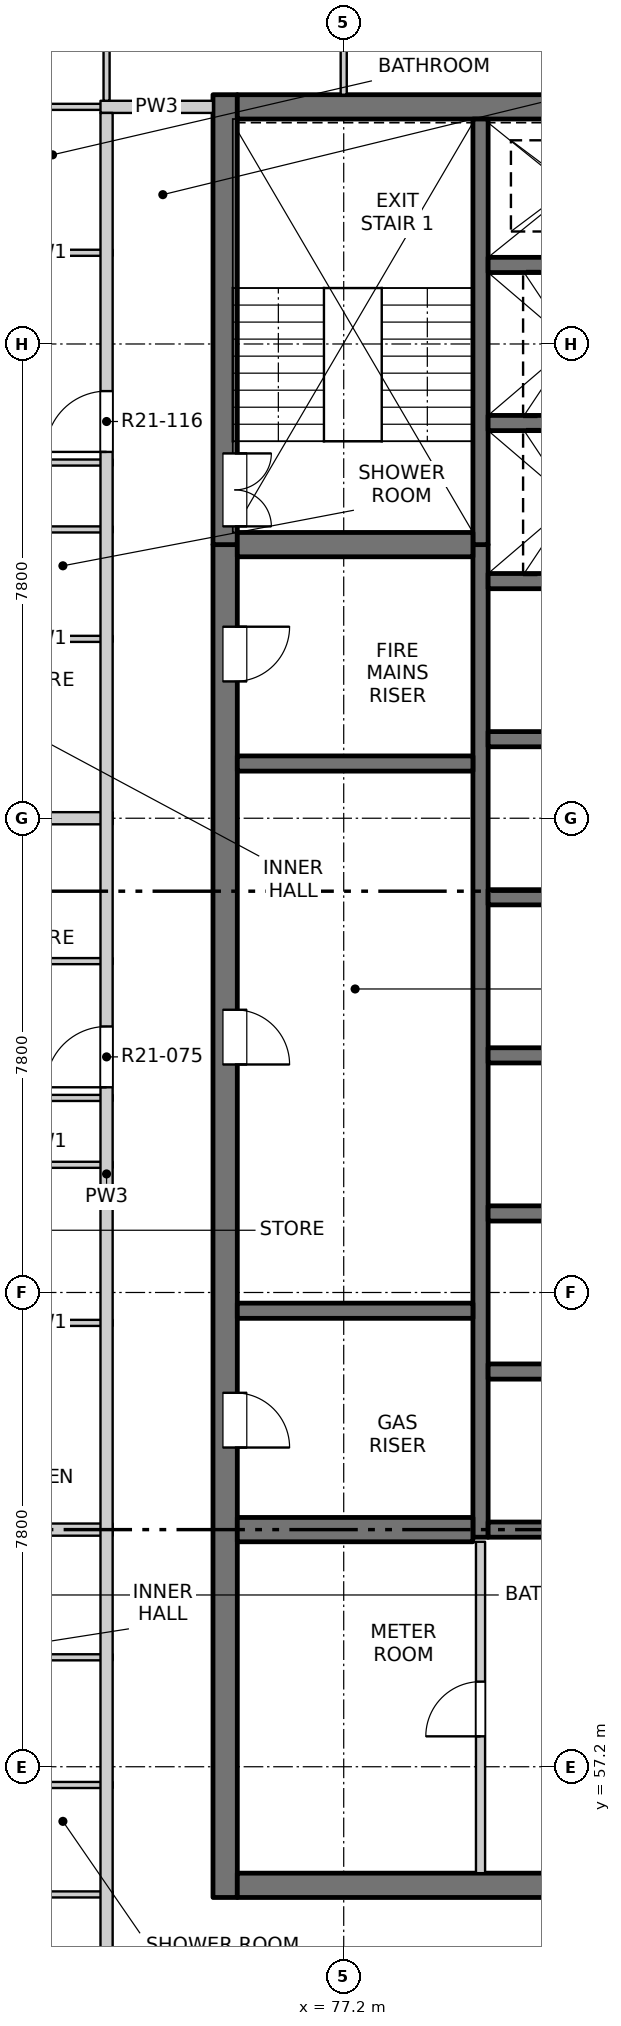
"""IFC4 building model, lengths in metres.
Left out: names, types, materials, properties, quantities, classifications, styles, units other than length and angle.
Written with IfcOpenShell. Run it as: python <this file> out.ifc"""

import sys

from ifc_helpers import new_model, si_unit, direction, frame, frame_2d, origin, place, context, subcontext, project, spatial, rectangle, extrude, element, fill, save


model = new_model("IFC4")
c1 = context("Model", 3, precision=1e-05, world=origin(), true_north=direction((0.0, 1.0)))
c2 = subcontext(c1, "Body", "Model", "MODEL_VIEW")
j1 = project(units=[si_unit("LENGTHUNIT", "METRE"), si_unit("PLANEANGLEUNIT", "RADIAN")], contexts=[c1])
p1 = place(None, origin())
s1 = spatial("IfcSite", under=j1, at=p1, CompositionType="ELEMENT")
p2 = place(p1, origin())
s2 = spatial("IfcBuilding", under=s1, at=p2, CompositionType="ELEMENT")
p3 = place(p2, frame((0.0, 0.0, 214.3)))
s3 = spatial("IfcBuildingStorey", under=s2, at=p3, CompositionType="ELEMENT", Elevation=214.3)
p4 = place(p3, frame((75.25, 55.05, -0.25), z_axis=(0.0, 0.0, 1.0), x_axis=(0.0, 1.0, 0.0)))
e1 = element("IfcWall", 1, at=p4, inside=s3, PredefinedType="SOLIDWALL", context=c2, shape_type="SweptSolid", body=[
    extrude(rectangle(XDim=22.25, YDim=0.4, at=frame_2d((11.125, 0.0))), origin(), (0.0, 0.0, 1.0), 3.4),
])
p5 = place(p4, frame((7.4, 0.0, 0.25)))
e2 = element("IfcOpeningElement", 2, at=p5, cuts=e1, PredefinedType="OPENING", context=c2, shape_type="SweptSolid", body=[
    extrude(rectangle(XDim=0.9, YDim=2.1, at=frame_2d((0.45, 1.05))), frame((0.0, 0.21, 0.0), z_axis=(0.0, -1.0, 0.0), x_axis=(1.0, 0.0, 0.0)), (0.0, 0.0, 1.0), 0.42),
])
p6 = place(p4, frame((13.7, 0.0, 0.25)))
e3 = element("IfcOpeningElement", 3, at=p6, cuts=e1, PredefinedType="OPENING", context=c2, shape_type="SweptSolid", body=[
    extrude(rectangle(XDim=0.9, YDim=2.1, at=frame_2d((0.45, 1.05))), frame((0.0, 0.21, 0.0), z_axis=(0.0, -1.0, 0.0), x_axis=(1.0, 0.0, 0.0)), (0.0, 0.0, 1.0), 0.42),
])
p7 = place(p4, frame((20.0, 0.0, 0.25)))
e4 = element("IfcOpeningElement", 4, at=p7, cuts=e1, PredefinedType="OPENING", context=c2, shape_type="SweptSolid", body=[
    extrude(rectangle(XDim=0.9, YDim=2.1, at=frame_2d((0.45, 1.05))), frame((0.0, 0.21, 0.0), z_axis=(0.0, -1.0, 0.0), x_axis=(1.0, 0.0, 0.0)), (0.0, 0.0, 1.0), 0.42),
])
p8 = place(p3, frame((75.25, 77.3, -0.25), z_axis=(0.0, 0.0, 1.0), x_axis=(0.0, 1.0, 0.0)))
e5 = element("IfcWall", 5, at=p8, inside=s3, PredefinedType="SOLIDWALL", context=c2, shape_type="SweptSolid", body=[
    extrude(rectangle(XDim=7.4, YDim=0.4, at=frame_2d((3.7, 0.0))), origin(), (0.0, 0.0, 1.0), 3.4),
])
p9 = place(p8, frame((0.3, 0.0, 0.25)))
e6 = element("IfcOpeningElement", 6, at=p9, cuts=e5, PredefinedType="OPENING", context=c2, shape_type="SweptSolid", body=[
    extrude(rectangle(XDim=1.2, YDim=2.1, at=frame_2d((0.6, 1.05))), frame((0.0, 0.21, 0.0), z_axis=(0.0, -1.0, 0.0), x_axis=(1.0, 0.0, 0.0)), (0.0, 0.0, 1.0), 0.42),
])
p10 = place(p3, frame((75.45, 55.25, -0.25), z_axis=(0.0, 0.0, 1.0), x_axis=(1.0, 0.0, 0.0)))
e7 = element("IfcWall", 7, at=p10, inside=s3, PredefinedType="SOLIDWALL", context=c2, shape_type="SweptSolid", body=[
    extrude(rectangle(XDim=19.1, YDim=0.4, at=frame_2d((9.55, 0.0))), origin(), (0.0, 0.0, 1.0), 3.4),
])
p11 = place(p10, frame((8.8, 0.0, 0.25)))
e8 = element("IfcOpeningElement", 8, at=p11, cuts=e7, PredefinedType="OPENING", context=c2, shape_type="SweptSolid", body=[
    extrude(rectangle(XDim=1.5, YDim=2.1, at=frame_2d((0.75, 1.05))), frame((0.0, 0.21, 0.0), z_axis=(0.0, -1.0, 0.0), x_axis=(1.0, 0.0, 0.0)), (0.0, 0.0, 1.0), 0.42),
])
p12 = place(p3, frame((75.45, 84.5, -0.25), z_axis=(0.0, 0.0, 1.0), x_axis=(1.0, 0.0, 0.0)))
e9 = element("IfcWall", 9, at=p12, inside=s3, PredefinedType="SOLIDWALL", context=c2, shape_type="SweptSolid", body=[
    extrude(rectangle(XDim=19.1, YDim=0.4, at=frame_2d((9.55, 0.0))), origin(), (0.0, 0.0, 1.0), 3.4),
])
p13 = place(p3, frame((79.45, 60.975, -0.25), z_axis=(0.0, 0.0, 1.0), x_axis=(0.0, 1.0, 0.0)))
e10 = element("IfcWall", 10, at=p13, inside=s3, PredefinedType="SOLIDWALL", context=c2, shape_type="SweptSolid", body=[
    extrude(rectangle(XDim=16.325, YDim=0.25, at=frame_2d((8.163, 0.0))), origin(), (0.0, 0.0, 1.0), 3.4),
])
p14 = place(p3, frame((79.45, 77.3, -0.25), z_axis=(0.0, 0.0, 1.0), x_axis=(0.0, 1.0, 0.0)))
e11 = element("IfcWall", 11, at=p14, inside=s3, PredefinedType="SOLIDWALL", context=c2, shape_type="SweptSolid", body=[
    extrude(rectangle(XDim=7.0, YDim=0.25, at=frame_2d((3.5, 0.0))), origin(), (0.0, 0.0, 1.0), 3.4),
])
for number, where, z_axis, x_axis in (
    (12, (79.575, 61.1, -0.25), (0.0, 0.0, 1.0), (1.0, 0.0, 0.0)),
    (13, (79.575, 63.7, -0.25), (0.0, 0.0, 1.0), (1.0, 0.0, 0.0)),
    (14, (79.575, 66.3, -0.25), (0.0, 0.0, 1.0), (1.0, 0.0, 0.0)),
    (15, (79.575, 68.9, -0.25), (0.0, 0.0, 1.0), (1.0, 0.0, 0.0)),
    (16, (79.575, 71.5, -0.25), (0.0, 0.0, 1.0), (1.0, 0.0, 0.0)),
    (17, (79.575, 74.1, -0.25), (0.0, 0.0, 1.0), (1.0, 0.0, 0.0)),
    (18, (79.575, 76.7, -0.25), (0.0, 0.0, 1.0), (1.0, 0.0, 0.0)),
    (19, (79.575, 79.3, -0.25), (0.0, 0.0, 1.0), (1.0, 0.0, 0.0)),
    (20, (79.575, 81.9, -0.25), (0.0, 0.0, 1.0), (1.0, 0.0, 0.0)),
):
    element("IfcWall", number, at=place(p3, frame(where, z_axis=z_axis, x_axis=x_axis)), inside=s3, PredefinedType="SOLIDWALL", context=c2, shape_type="SweptSolid", body=[
        extrude(rectangle(XDim=3.0, YDim=0.25, at=frame_2d((1.5, 0.0))), origin(), (0.0, 0.0, 1.0), 3.4),
    ])
p15 = place(p3, frame((75.45, 61.1, -0.25), z_axis=(0.0, 0.0, 1.0), x_axis=(1.0, 0.0, 0.0)))
e21 = element("IfcWall", 21, at=p15, inside=s3, PredefinedType="SOLIDWALL", context=c2, shape_type="SweptSolid", body=[
    extrude(rectangle(XDim=3.875, YDim=0.4, at=frame_2d((1.938, 0.0))), origin(), (0.0, 0.0, 1.0), 3.4),
])
for number, where, z_axis, x_axis in (
    (22, (75.45, 64.7, -0.25), (0.0, 0.0, 1.0), (1.0, 0.0, 0.0)),
    (23, (75.45, 73.7, -0.25), (0.0, 0.0, 1.0), (1.0, 0.0, 0.0)),
):
    element("IfcWall", number, at=place(p3, frame(where, z_axis=z_axis, x_axis=x_axis)), inside=s3, PredefinedType="SOLIDWALL", context=c2, shape_type="SweptSolid", body=[
        extrude(rectangle(XDim=3.875, YDim=0.25, at=frame_2d((1.938, 0.0))), origin(), (0.0, 0.0, 1.0), 3.4),
    ])
p16 = place(p3, frame((75.45, 77.3, -0.25), z_axis=(0.0, 0.0, 1.0), x_axis=(1.0, 0.0, 0.0)))
e24 = element("IfcWall", 24, at=p16, inside=s3, PredefinedType="SOLIDWALL", context=c2, shape_type="SweptSolid", body=[
    extrude(rectangle(XDim=3.875, YDim=0.4, at=frame_2d((1.938, 0.0))), origin(), (0.0, 0.0, 1.0), 3.4),
])
for number, where, z_axis, x_axis in (
    (25, (71.18, 55.1, 0.0), (0.0, 0.0, 1.0), (1.0, 0.0, 0.0)),
    (26, (71.18, 56.9, 0.0), (0.0, 0.0, 1.0), (1.0, 0.0, 0.0)),
    (27, (71.18, 59.0, 0.0), (0.0, 0.0, 1.0), (1.0, 0.0, 0.0)),
):
    element("IfcWall", number, at=place(p3, frame(where, z_axis=z_axis, x_axis=x_axis)), inside=s3, PredefinedType="PARTITIONING", context=c2, shape_type="SweptSolid", body=[
        extrude(rectangle(XDim=2.22, YDim=0.1, at=frame_2d((1.11, 0.0))), origin(), (0.0, 0.0, 1.0), 3.15),
    ])
p17 = place(p3, frame((61.9, 61.1, 0.0), z_axis=(0.0, 0.0, 1.0), x_axis=(1.0, 0.0, 0.0)))
e28 = element("IfcWall", 28, at=p17, inside=s3, PredefinedType="PARTITIONING", context=c2, shape_type="SweptSolid", body=[
    extrude(rectangle(XDim=11.5, YDim=0.2, at=frame_2d((5.75, 0.0))), origin(), (0.0, 0.0, 1.0), 2.55),
])
for number, where, z_axis, x_axis in (
    (29, (71.18, 64.5, 0.0), (0.0, 0.0, 1.0), (1.0, 0.0, 0.0)),
    (30, (71.18, 67.1, 0.0), (0.0, 0.0, 1.0), (1.0, 0.0, 0.0)),
    (31, (71.18, 68.2, 0.0), (0.0, 0.0, 1.0), (1.0, 0.0, 0.0)),
    (32, (71.18, 70.45, 0.0), (0.0, 0.0, 1.0), (1.0, 0.0, 0.0)),
):
    element("IfcWall", number, at=place(p3, frame(where, z_axis=z_axis, x_axis=x_axis)), inside=s3, PredefinedType="PARTITIONING", context=c2, shape_type="SweptSolid", body=[
        extrude(rectangle(XDim=2.22, YDim=0.1, at=frame_2d((1.11, 0.0))), origin(), (0.0, 0.0, 1.0), 3.15),
    ])
p18 = place(p3, frame((61.9, 72.8, 0.0), z_axis=(0.0, 0.0, 1.0), x_axis=(1.0, 0.0, 0.0)))
e33 = element("IfcWall", 33, at=p18, inside=s3, PredefinedType="PARTITIONING", context=c2, shape_type="SweptSolid", body=[
    extrude(rectangle(XDim=11.5, YDim=0.2, at=frame_2d((5.75, 0.0))), origin(), (0.0, 0.0, 1.0), 3.15),
])
for number, where, z_axis, x_axis in (
    (34, (71.18, 75.75, 0.0), (0.0, 0.0, 1.0), (1.0, 0.0, 0.0)),
    (35, (71.18, 77.55, 0.0), (0.0, 0.0, 1.0), (1.0, 0.0, 0.0)),
    (36, (71.18, 78.65, 0.0), (0.0, 0.0, 1.0), (1.0, 0.0, 0.0)),
    (37, (71.18, 82.1, 0.0), (0.0, 0.0, 1.0), (1.0, 0.0, 0.0)),
):
    element("IfcWall", number, at=place(p3, frame(where, z_axis=z_axis, x_axis=x_axis)), inside=s3, PredefinedType="PARTITIONING", context=c2, shape_type="SweptSolid", body=[
        extrude(rectangle(XDim=2.22, YDim=0.1, at=frame_2d((1.11, 0.0))), origin(), (0.0, 0.0, 1.0), 3.15),
    ])
p19 = place(p3, frame((61.9, 84.5, 0.0), z_axis=(0.0, 0.0, 1.0), x_axis=(1.0, 0.0, 0.0)))
e38 = element("IfcWall", 38, at=p19, inside=s3, PredefinedType="PARTITIONING", context=c2, shape_type="SweptSolid", body=[
    extrude(rectangle(XDim=11.5, YDim=0.1, at=frame_2d((5.75, 0.0))), origin(), (0.0, 0.0, 1.0), 3.15),
])
p20 = place(p19, frame((7.965, 0.0, 0.0)))
e39 = element("IfcOpeningElement", 39, at=p20, cuts=e38, PredefinedType="OPENING", context=c2, shape_type="SweptSolid", body=[
    extrude(rectangle(XDim=0.9, YDim=2.1, at=frame_2d((0.45, 1.05))), frame((0.0, 0.06, 0.0), z_axis=(0.0, -1.0, 0.0), x_axis=(1.0, 0.0, 0.0)), (0.0, 0.0, 1.0), 0.12),
])
p21 = place(p3, frame((73.2, 84.5, 0.0), z_axis=(0.0, 0.0, 1.0), x_axis=(1.0, 0.0, 0.0)))
e40 = element("IfcWall", 40, at=p21, inside=s3, PredefinedType="PARTITIONING", context=c2, shape_type="SweptSolid", body=[
    extrude(rectangle(XDim=1.85, YDim=0.2, at=frame_2d((0.925, 0.0))), origin(), (0.0, 0.0, 1.0), 3.15),
])
p22 = place(p3, frame((73.3, 49.5, 0.0), z_axis=(0.0, 0.0, 1.0), x_axis=(0.0, 1.0, 0.0)))
e41 = element("IfcWall", 41, at=p22, inside=s3, PredefinedType="PARTITIONING", context=c2, shape_type="SweptSolid", body=[
    extrude(rectangle(XDim=34.9, YDim=0.2, at=frame_2d((17.45, 0.0))), origin(), (0.0, 0.0, 1.0), 3.15),
])
p23 = place(p22, frame((3.325, 0.0, 0.0)))
e42 = element("IfcOpeningElement", 42, at=p23, cuts=e41, PredefinedType="OPENING", context=c2, shape_type="SweptSolid", body=[
    extrude(rectangle(XDim=1.0, YDim=2.1, at=frame_2d((0.5, 1.05))), frame((0.0, 0.11, 0.0), z_axis=(0.0, -1.0, 0.0), x_axis=(1.0, 0.0, 0.0)), (0.0, 0.0, 1.0), 0.22),
])
p24 = place(p22, frame((18.875, 0.0, 0.0)))
e43 = element("IfcOpeningElement", 43, at=p24, cuts=e41, PredefinedType="OPENING", context=c2, shape_type="SweptSolid", body=[
    extrude(rectangle(XDim=1.0, YDim=2.1, at=frame_2d((0.5, 1.05))), frame((0.0, 0.11, 0.0), z_axis=(0.0, -1.0, 0.0), x_axis=(1.0, 0.0, 0.0)), (0.0, 0.0, 1.0), 0.22),
])
p25 = place(p22, frame((29.325, 0.0, 0.0)))
e44 = element("IfcOpeningElement", 44, at=p25, cuts=e41, PredefinedType="OPENING", context=c2, shape_type="SweptSolid", body=[
    extrude(rectangle(XDim=1.0, YDim=2.1, at=frame_2d((0.5, 1.05))), frame((0.0, 0.11, 0.0), z_axis=(0.0, -1.0, 0.0), x_axis=(1.0, 0.0, 0.0)), (0.0, 0.0, 1.0), 0.22),
])
p26 = place(p3, frame((73.3, 84.6, 0.0), z_axis=(0.0, 0.0, 1.0), x_axis=(0.0, 1.0, 0.0)))
e45 = element("IfcWall", 45, at=p26, inside=s3, PredefinedType="PARTITIONING", context=c2, shape_type="SweptSolid", body=[
    extrude(rectangle(XDim=3.5, YDim=0.1, at=frame_2d((1.75, 0.0))), origin(), (0.0, 0.0, 1.0), 3.15),
])
p27 = place(p26, frame((1.4, 0.0, 0.0)))
e46 = element("IfcOpeningElement", 46, at=p27, cuts=e45, PredefinedType="OPENING", context=c2, shape_type="SweptSolid", body=[
    extrude(rectangle(XDim=0.9, YDim=2.1, at=frame_2d((0.45, 1.05))), frame((0.0, 0.06, 0.0), z_axis=(0.0, -1.0, 0.0), x_axis=(1.0, 0.0, 0.0)), (0.0, 0.0, 1.0), 0.12),
])
p28 = place(p3, frame((77.2, 84.7, 0.0), z_axis=(0.0, 0.0, 1.0), x_axis=(0.0, 1.0, 0.0)))
e47 = element("IfcWall", 47, at=p28, inside=s3, PredefinedType="PARTITIONING", context=c2, shape_type="SweptSolid", body=[
    extrude(rectangle(XDim=3.4, YDim=0.1, at=frame_2d((1.7, 0.0))), origin(), (0.0, 0.0, 1.0), 3.15),
])
p29 = place(p28, frame((1.3, 0.0, 0.0)))
e48 = element("IfcOpeningElement", 48, at=p29, cuts=e47, PredefinedType="OPENING", context=c2, shape_type="SweptSolid", body=[
    extrude(rectangle(XDim=0.9, YDim=2.1, at=frame_2d((0.45, 1.05))), frame((0.0, 0.06, 0.0), z_axis=(0.0, -1.0, 0.0), x_axis=(1.0, 0.0, 0.0)), (0.0, 0.0, 1.0), 0.12),
])
p30 = place(p3, frame((79.45, 55.45, 0.0), z_axis=(0.0, 0.0, 1.0), x_axis=(0.0, 1.0, 0.0)))
e49 = element("IfcWall", 49, at=p30, inside=s3, PredefinedType="PARTITIONING", context=c2, shape_type="SweptSolid", body=[
    extrude(rectangle(XDim=5.45, YDim=0.15, at=frame_2d((2.725, 0.0))), origin(), (0.0, 0.0, 1.0), 3.15),
])
p31 = place(p30, frame((2.25, 0.0, 0.0)))
e50 = element("IfcOpeningElement", 50, at=p31, cuts=e49, PredefinedType="OPENING", context=c2, shape_type="SweptSolid", body=[
    extrude(rectangle(XDim=0.9, YDim=2.1, at=frame_2d((0.45, 1.05))), frame((0.0, 0.085, 0.0), z_axis=(0.0, -1.0, 0.0), x_axis=(1.0, 0.0, 0.0)), (0.0, 0.0, 1.0), 0.17),
])
p32 = place(p31, origin())
e51 = element("IfcDoor", 51, at=p32, inside=s3, OperationType="SINGLE_SWING_LEFT", PredefinedType="DOOR", context=c2, shape_type="SweptSolid", body=[
    extrude(rectangle(XDim=0.9, YDim=2.1, at=frame_2d((0.45, 1.05))), frame((0.0, 0.025, 0.0), z_axis=(0.0, -1.0, 0.0), x_axis=(1.0, 0.0, 0.0)), (0.0, 0.0, 1.0), 0.05),
])
fill(e50, e51)
p33 = place(p5, origin())
e52 = element("IfcDoor", 52, at=p33, inside=s3, OperationType="SINGLE_SWING_RIGHT", PredefinedType="DOOR", context=c2, shape_type="SweptSolid", body=[
    extrude(rectangle(XDim=0.9, YDim=2.1, at=frame_2d((0.45, 1.05))), frame((0.0, -0.135, 0.0), z_axis=(0.0, -1.0, 0.0), x_axis=(1.0, 0.0, 0.0)), (0.0, 0.0, 1.0), 0.05),
])
fill(e2, e52)
p34 = place(p24, origin())
e53 = element("IfcDoor", 53, at=p34, inside=s3, OperationType="SINGLE_SWING_RIGHT", PredefinedType="DOOR", context=c2, shape_type="SweptSolid", body=[
    extrude(rectangle(XDim=1.0, YDim=2.1, at=frame_2d((0.5, 1.05))), frame((0.0, 0.025, 0.0), z_axis=(0.0, -1.0, 0.0), x_axis=(1.0, 0.0, 0.0)), (0.0, 0.0, 1.0), 0.05),
])
fill(e43, e53)
p35 = place(p6, origin())
e54 = element("IfcDoor", 54, at=p35, inside=s3, OperationType="SINGLE_SWING_RIGHT", PredefinedType="DOOR", context=c2, shape_type="SweptSolid", body=[
    extrude(rectangle(XDim=0.9, YDim=2.1, at=frame_2d((0.45, 1.05))), frame((0.0, -0.135, 0.0), z_axis=(0.0, -1.0, 0.0), x_axis=(1.0, 0.0, 0.0)), (0.0, 0.0, 1.0), 0.05),
])
fill(e3, e54)
p36 = place(p7, origin())
e55 = element("IfcDoor", 55, at=p36, inside=s3, OperationType="SINGLE_SWING_LEFT", PredefinedType="DOOR", context=c2, shape_type="SweptSolid", body=[
    extrude(rectangle(XDim=0.9, YDim=2.1, at=frame_2d((0.45, 1.05))), frame((0.0, -0.135, 0.0), z_axis=(0.0, -1.0, 0.0), x_axis=(1.0, 0.0, 0.0)), (0.0, 0.0, 1.0), 0.05),
])
fill(e4, e55)
p37 = place(p9, origin())
e56 = element("IfcDoor", 56, at=p37, inside=s3, OperationType="DOUBLE_DOOR_SINGLE_SWING", PredefinedType="DOOR", context=c2, shape_type="SweptSolid", body=[
    extrude(rectangle(XDim=1.2, YDim=2.1, at=frame_2d((0.6, 1.05))), frame((0.0, -0.135, 0.0), z_axis=(0.0, -1.0, 0.0), x_axis=(1.0, 0.0, 0.0)), (0.0, 0.0, 1.0), 0.05),
])
fill(e6, e56)
p38 = place(p25, origin())
e57 = element("IfcDoor", 57, at=p38, inside=s3, OperationType="SINGLE_SWING_RIGHT", PredefinedType="DOOR", context=c2, shape_type="SweptSolid", body=[
    extrude(rectangle(XDim=1.0, YDim=2.1, at=frame_2d((0.5, 1.05))), frame((0.0, 0.025, 0.0), z_axis=(0.0, -1.0, 0.0), x_axis=(1.0, 0.0, 0.0)), (0.0, 0.0, 1.0), 0.05),
])
fill(e44, e57)
save(model, sys.argv[1])
